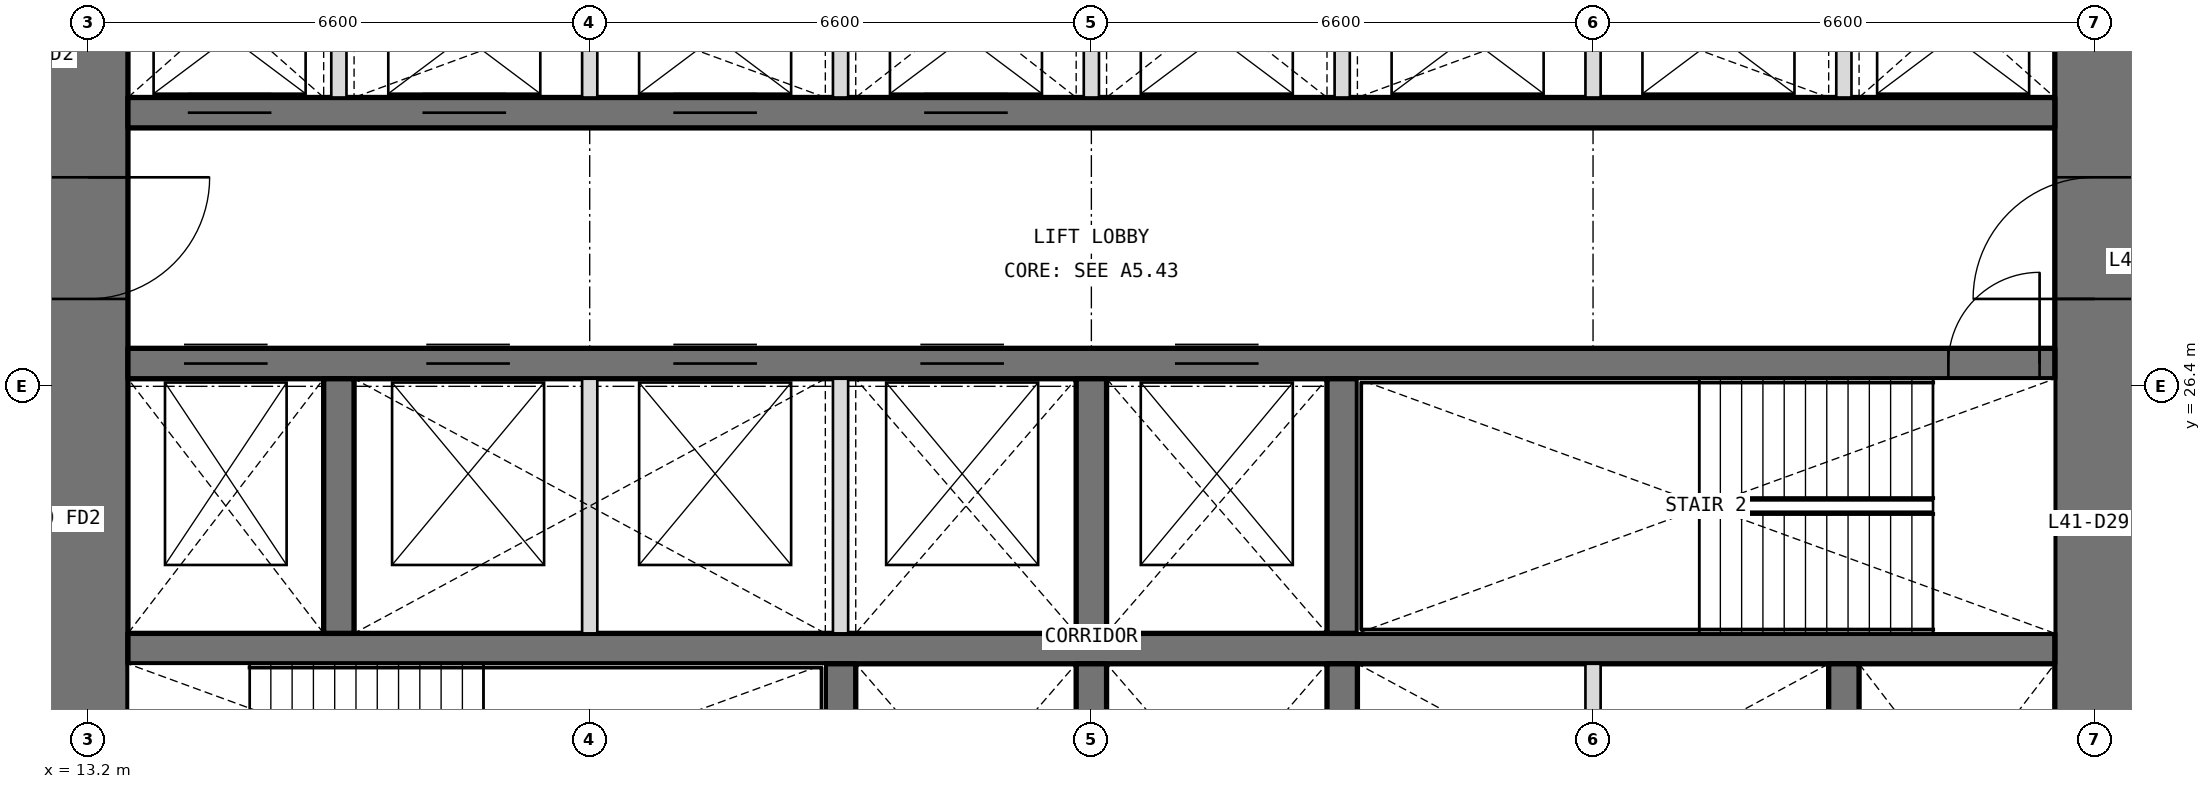
"""IFC4 building model, lengths in metres.
Left out: names, types, materials, properties, quantities, classifications, styles, units other than length and angle.
Written with IfcOpenShell. Run it as: python <this file> out.ifc"""

import sys

from ifc_helpers import new_model, si_unit, direction, frame, frame_2d, origin, place, context, subcontext, project, spatial, rectangle, extrude, element, fill, save


model = new_model("IFC4")
c1 = context("Model", 3, precision=1e-05, world=origin(), true_north=direction((0.0, 1.0)))
c2 = subcontext(c1, "Body", "Model", "MODEL_VIEW")
j1 = project(units=[si_unit("LENGTHUNIT", "METRE"), si_unit("PLANEANGLEUNIT", "RADIAN")], contexts=[c1])
p1 = place(None, origin())
s1 = spatial("IfcSite", under=j1, at=p1, CompositionType="ELEMENT")
p2 = place(p1, origin())
s2 = spatial("IfcBuilding", under=s1, at=p2, CompositionType="ELEMENT")
p3 = place(p2, frame((0.0, 0.0, 180.9)))
s3 = spatial("IfcBuildingStorey", under=s2, at=p3, CompositionType="ELEMENT", Elevation=180.9)
p4 = place(p3, frame((39.6, 13.725, 0.0), z_axis=(0.0, 0.0, 1.0), x_axis=(0.0, 1.0, 0.0)))
e1 = element("IfcWall", 1, at=p4, inside=s3, PredefinedType="SHEAR", context=c2, shape_type="SweptSolid", body=[
    extrude(rectangle(XDim=18.75, YDim=1.05, at=frame_2d((9.375, 0.0))), origin(), (0.0, 0.0, 1.0), 4.2),
])
p5 = place(p4, frame((3.025, 0.0, 0.0)))
e2 = element("IfcOpeningElement", 2, at=p5, cuts=e1, PredefinedType="OPENING", context=c2, shape_type="SweptSolid", body=[
    extrude(rectangle(XDim=1.6, YDim=2.1, at=frame_2d((0.8, 1.05))), frame((0.0, 0.535, 0.0), z_axis=(0.0, -1.0, 0.0), x_axis=(1.0, 0.0, 0.0)), (0.0, 0.0, 1.0), 1.07),
])
p6 = place(p4, frame((13.825, 0.0, 0.0)))
e3 = element("IfcOpeningElement", 3, at=p6, cuts=e1, PredefinedType="OPENING", context=c2, shape_type="SweptSolid", body=[
    extrude(rectangle(XDim=1.6, YDim=2.1, at=frame_2d((0.8, 1.05))), frame((0.0, 0.535, 0.0), z_axis=(0.0, -1.0, 0.0), x_axis=(1.0, 0.0, 0.0)), (0.0, 0.0, 1.0), 1.07),
])
p7 = place(p3, frame((13.2, 32.475, 0.0), z_axis=(0.0, 0.0, 1.0), x_axis=(0.0, -1.0, 0.0)))
e4 = element("IfcWall", 4, at=p7, inside=s3, PredefinedType="SHEAR", context=c2, shape_type="SweptSolid", body=[
    extrude(rectangle(XDim=18.75, YDim=1.05, at=frame_2d((9.375, 0.0))), origin(), (0.0, 0.0, 1.0), 4.2),
])
p8 = place(p7, frame((14.125, 0.0, 0.0)))
e5 = element("IfcOpeningElement", 5, at=p8, cuts=e4, PredefinedType="OPENING", context=c2, shape_type="SweptSolid", body=[
    extrude(rectangle(XDim=1.6, YDim=2.1, at=frame_2d((0.8, 1.05))), frame((0.0, 0.535, 0.0), z_axis=(0.0, -1.0, 0.0), x_axis=(1.0, 0.0, 0.0)), (0.0, 0.0, 1.0), 1.07),
])
p9 = place(p7, frame((3.325, 0.0, 0.0)))
e6 = element("IfcOpeningElement", 6, at=p9, cuts=e4, PredefinedType="OPENING", context=c2, shape_type="SweptSolid", body=[
    extrude(rectangle(XDim=1.6, YDim=2.1, at=frame_2d((0.8, 1.05))), frame((0.0, 0.535, 0.0), z_axis=(0.0, -1.0, 0.0), x_axis=(1.0, 0.0, 0.0)), (0.0, 0.0, 1.0), 1.07),
])
p10 = place(p3, frame((13.725, 22.95, 0.0), z_axis=(0.0, 0.0, 1.0), x_axis=(1.0, 0.0, 0.0)))
e7 = element("IfcWall", 7, at=p10, inside=s3, PredefinedType="SHEAR", context=c2, shape_type="SweptSolid", body=[
    extrude(rectangle(XDim=25.35, YDim=0.4, at=frame_2d((12.675, 0.0))), origin(), (0.0, 0.0, 1.0), 4.2),
])
p11 = place(p3, frame((13.725, 26.7, 0.0), z_axis=(0.0, 0.0, 1.0), x_axis=(1.0, 0.0, 0.0)))
e8 = element("IfcWall", 8, at=p11, inside=s3, PredefinedType="SHEAR", context=c2, shape_type="SweptSolid", body=[
    extrude(rectangle(XDim=25.35, YDim=0.4, at=frame_2d((12.675, 0.0))), origin(), (0.0, 0.0, 1.0), 4.2),
])
p12 = place(p11, frame((23.95, 0.0, 0.0)))
e9 = element("IfcOpeningElement", 9, at=p12, cuts=e8, PredefinedType="OPENING", context=c2, shape_type="SweptSolid", body=[
    extrude(rectangle(XDim=1.2, YDim=2.1, at=frame_2d((0.6, 1.05))), frame((0.0, 0.21, 0.0), z_axis=(0.0, -1.0, 0.0), x_axis=(1.0, 0.0, 0.0)), (0.0, 0.0, 1.0), 0.42),
])
p13 = place(p11, frame((0.738, 0.0, 0.0)))
e10 = element("IfcOpeningElement", 10, at=p13, cuts=e8, PredefinedType="OPENING", context=c2, shape_type="SweptSolid", body=[
    extrude(rectangle(XDim=1.1, YDim=2.1, at=frame_2d((0.55, 1.05))), frame((0.0, 0.21, 0.0), z_axis=(0.0, -1.0, 0.0), x_axis=(1.0, 0.0, 0.0)), (0.0, 0.0, 1.0), 0.42),
])
p14 = place(p11, frame((3.925, 0.0, 0.0)))
e11 = element("IfcOpeningElement", 11, at=p14, cuts=e8, PredefinedType="OPENING", context=c2, shape_type="SweptSolid", body=[
    extrude(rectangle(XDim=1.1, YDim=2.1, at=frame_2d((0.55, 1.05))), frame((0.0, 0.21, 0.0), z_axis=(0.0, -1.0, 0.0), x_axis=(1.0, 0.0, 0.0)), (0.0, 0.0, 1.0), 0.42),
])
p15 = place(p11, frame((7.175, 0.0, 0.0)))
e12 = element("IfcOpeningElement", 12, at=p15, cuts=e8, PredefinedType="OPENING", context=c2, shape_type="SweptSolid", body=[
    extrude(rectangle(XDim=1.1, YDim=2.1, at=frame_2d((0.55, 1.05))), frame((0.0, 0.21, 0.0), z_axis=(0.0, -1.0, 0.0), x_axis=(1.0, 0.0, 0.0)), (0.0, 0.0, 1.0), 0.42),
])
p16 = place(p11, frame((10.425, 0.0, 0.0)))
e13 = element("IfcOpeningElement", 13, at=p16, cuts=e8, PredefinedType="OPENING", context=c2, shape_type="SweptSolid", body=[
    extrude(rectangle(XDim=1.1, YDim=2.1, at=frame_2d((0.55, 1.05))), frame((0.0, 0.21, 0.0), z_axis=(0.0, -1.0, 0.0), x_axis=(1.0, 0.0, 0.0)), (0.0, 0.0, 1.0), 0.42),
])
p17 = place(p11, frame((13.775, 0.0, 0.0)))
e14 = element("IfcOpeningElement", 14, at=p17, cuts=e8, PredefinedType="OPENING", context=c2, shape_type="SweptSolid", body=[
    extrude(rectangle(XDim=1.1, YDim=2.1, at=frame_2d((0.55, 1.05))), frame((0.0, 0.21, 0.0), z_axis=(0.0, -1.0, 0.0), x_axis=(1.0, 0.0, 0.0)), (0.0, 0.0, 1.0), 0.42),
])
p18 = place(p3, frame((13.725, 30.0, 0.0), z_axis=(0.0, 0.0, 1.0), x_axis=(1.0, 0.0, 0.0)))
e15 = element("IfcWall", 15, at=p18, inside=s3, PredefinedType="SHEAR", context=c2, shape_type="SweptSolid", body=[
    extrude(rectangle(XDim=25.35, YDim=0.4, at=frame_2d((12.675, 0.0))), origin(), (0.0, 0.0, 1.0), 4.2),
])
p19 = place(p18, frame((0.788, 0.0, 0.0)))
e16 = element("IfcOpeningElement", 16, at=p19, cuts=e15, PredefinedType="OPENING", context=c2, shape_type="SweptSolid", body=[
    extrude(rectangle(XDim=1.1, YDim=2.1, at=frame_2d((0.55, 1.05))), frame((0.0, 0.21, 0.0), z_axis=(0.0, -1.0, 0.0), x_axis=(1.0, 0.0, 0.0)), (0.0, 0.0, 1.0), 0.42),
])
p20 = place(p18, frame((3.875, 0.0, 0.0)))
e17 = element("IfcOpeningElement", 17, at=p20, cuts=e15, PredefinedType="OPENING", context=c2, shape_type="SweptSolid", body=[
    extrude(rectangle(XDim=1.1, YDim=2.1, at=frame_2d((0.55, 1.05))), frame((0.0, 0.21, 0.0), z_axis=(0.0, -1.0, 0.0), x_axis=(1.0, 0.0, 0.0)), (0.0, 0.0, 1.0), 0.42),
])
p21 = place(p18, frame((7.175, 0.0, 0.0)))
e18 = element("IfcOpeningElement", 18, at=p21, cuts=e15, PredefinedType="OPENING", context=c2, shape_type="SweptSolid", body=[
    extrude(rectangle(XDim=1.1, YDim=2.1, at=frame_2d((0.55, 1.05))), frame((0.0, 0.21, 0.0), z_axis=(0.0, -1.0, 0.0), x_axis=(1.0, 0.0, 0.0)), (0.0, 0.0, 1.0), 0.42),
])
p22 = place(p18, frame((10.475, 0.0, 0.0)))
e19 = element("IfcOpeningElement", 19, at=p22, cuts=e15, PredefinedType="OPENING", context=c2, shape_type="SweptSolid", body=[
    extrude(rectangle(XDim=1.1, YDim=2.1, at=frame_2d((0.55, 1.05))), frame((0.0, 0.21, 0.0), z_axis=(0.0, -1.0, 0.0), x_axis=(1.0, 0.0, 0.0)), (0.0, 0.0, 1.0), 0.42),
])
for number, where, z_axis, x_axis in (
    (20, (23.1, 19.4, 0.0), (0.0, 0.0, 1.0), (0.0, 1.0, 0.0)),
    (21, (26.4, 19.4, 0.0), (0.0, 0.0, 1.0), (0.0, 1.0, 0.0)),
    (22, (29.7, 19.4, 0.0), (0.0, 0.0, 1.0), (0.0, 1.0, 0.0)),
    (23, (36.3, 19.4, 0.0), (0.0, 0.0, 1.0), (0.0, 1.0, 0.0)),
    (24, (16.5, 23.15, 0.0), (0.0, 0.0, 1.0), (0.0, 1.0, 0.0)),
    (25, (26.4, 23.15, 0.0), (0.0, 0.0, 1.0), (0.0, 1.0, 0.0)),
    (26, (29.7, 23.15, 0.0), (0.0, 0.0, 1.0), (0.0, 1.0, 0.0)),
):
    element("IfcWall", number, at=place(p3, frame(where, z_axis=z_axis, x_axis=x_axis)), inside=s3, PredefinedType="SHEAR", context=c2, shape_type="SweptSolid", body=[
        extrude(rectangle(XDim=3.35, YDim=0.4, at=frame_2d((1.675, 0.0))), origin(), (0.0, 0.0, 1.0), 4.2),
    ])
for number, where, z_axis, x_axis in (
    (27, (16.5, 30.2, 0.0), (0.0, 0.0, 1.0), (0.0, 1.0, 0.0)),
    (28, (19.8, 30.2, 0.0), (0.0, 0.0, 1.0), (0.0, 1.0, 0.0)),
    (29, (23.1, 30.2, 0.0), (0.0, 0.0, 1.0), (0.0, 1.0, 0.0)),
    (30, (26.4, 30.2, 0.0), (0.0, 0.0, 1.0), (0.0, 1.0, 0.0)),
    (31, (29.7, 30.2, 0.0), (0.0, 0.0, 1.0), (0.0, 1.0, 0.0)),
    (32, (33.0, 30.2, 0.0), (0.0, 0.0, 1.0), (0.0, 1.0, 0.0)),
    (33, (36.3, 30.2, 0.0), (0.0, 0.0, 1.0), (0.0, 1.0, 0.0)),
):
    element("IfcWall", number, at=place(p3, frame(where, z_axis=z_axis, x_axis=x_axis)), inside=s3, PredefinedType="PARTITIONING", context=c2, shape_type="SweptSolid", body=[
        extrude(rectangle(XDim=2.275, YDim=0.2, at=frame_2d((1.138, 0.0))), origin(), (0.0, 0.0, 1.0), 4.2),
    ])
for number, where, z_axis, x_axis in (
    (34, (33.0, 19.4, 0.0), (0.0, 0.0, 1.0), (0.0, 1.0, 0.0)),
    (35, (19.8, 23.15, 0.0), (0.0, 0.0, 1.0), (0.0, 1.0, 0.0)),
    (36, (23.1, 23.15, 0.0), (0.0, 0.0, 1.0), (0.0, 1.0, 0.0)),
):
    element("IfcWall", number, at=place(p3, frame(where, z_axis=z_axis, x_axis=x_axis)), inside=s3, PredefinedType="PARTITIONING", context=c2, shape_type="SweptSolid", body=[
        extrude(rectangle(XDim=3.35, YDim=0.2, at=frame_2d((1.675, 0.0))), origin(), (0.0, 0.0, 1.0), 4.2),
    ])
p23 = place(p12, origin())
e37 = element("IfcDoor", 37, at=p23, inside=s3, OperationType="SINGLE_SWING_RIGHT", PredefinedType="DOOR", context=c2, shape_type="SweptSolid", body=[
    extrude(rectangle(XDim=1.2, YDim=2.1, at=frame_2d((0.6, 1.05))), frame((0.0, 0.025, 0.0), z_axis=(0.0, -1.0, 0.0), x_axis=(1.0, 0.0, 0.0)), (0.0, 0.0, 1.0), 0.05),
])
fill(e9, e37)
p24 = place(p9, origin())
e38 = element("IfcDoor", 38, at=p24, inside=s3, OperationType="DOUBLE_DOOR_DOUBLE_SWING", PredefinedType="DOOR", context=c2, shape_type="SweptSolid", body=[
    extrude(rectangle(XDim=1.6, YDim=2.1, at=frame_2d((0.8, 1.05))), frame((0.0, 0.025, 0.0), z_axis=(0.0, -1.0, 0.0), x_axis=(1.0, 0.0, 0.0)), (0.0, 0.0, 1.0), 0.05),
])
fill(e6, e38)
p25 = place(p6, origin())
e39 = element("IfcDoor", 39, at=p25, inside=s3, OperationType="DOUBLE_DOOR_DOUBLE_SWING", PredefinedType="DOOR", context=c2, shape_type="SweptSolid", body=[
    extrude(rectangle(XDim=1.6, YDim=2.1, at=frame_2d((0.8, 1.05))), frame((0.0, 0.025, 0.0), z_axis=(0.0, -1.0, 0.0), x_axis=(1.0, 0.0, 0.0)), (0.0, 0.0, 1.0), 0.05),
])
fill(e3, e39)
p26 = place(p19, origin())
e40 = element("IfcDoor", 40, at=p26, inside=s3, OperationType="DOUBLE_DOOR_SLIDING", PredefinedType="DOOR", context=c2, shape_type="SweptSolid", body=[
    extrude(rectangle(XDim=1.1, YDim=2.1, at=frame_2d((0.55, 1.05))), frame((0.0, 0.025, 0.0), z_axis=(0.0, -1.0, 0.0), x_axis=(1.0, 0.0, 0.0)), (0.0, 0.0, 1.0), 0.05),
])
fill(e16, e40)
p27 = place(p20, origin())
e41 = element("IfcDoor", 41, at=p27, inside=s3, OperationType="DOUBLE_DOOR_SLIDING", PredefinedType="DOOR", context=c2, shape_type="SweptSolid", body=[
    extrude(rectangle(XDim=1.1, YDim=2.1, at=frame_2d((0.55, 1.05))), frame((0.0, 0.025, 0.0), z_axis=(0.0, -1.0, 0.0), x_axis=(1.0, 0.0, 0.0)), (0.0, 0.0, 1.0), 0.05),
])
fill(e17, e41)
p28 = place(p21, origin())
e42 = element("IfcDoor", 42, at=p28, inside=s3, OperationType="DOUBLE_DOOR_SLIDING", PredefinedType="DOOR", context=c2, shape_type="SweptSolid", body=[
    extrude(rectangle(XDim=1.1, YDim=2.1, at=frame_2d((0.55, 1.05))), frame((0.0, 0.025, 0.0), z_axis=(0.0, -1.0, 0.0), x_axis=(1.0, 0.0, 0.0)), (0.0, 0.0, 1.0), 0.05),
])
fill(e18, e42)
p29 = place(p22, origin())
e43 = element("IfcDoor", 43, at=p29, inside=s3, OperationType="DOUBLE_DOOR_SLIDING", PredefinedType="DOOR", context=c2, shape_type="SweptSolid", body=[
    extrude(rectangle(XDim=1.1, YDim=2.1, at=frame_2d((0.55, 1.05))), frame((0.0, 0.025, 0.0), z_axis=(0.0, -1.0, 0.0), x_axis=(1.0, 0.0, 0.0)), (0.0, 0.0, 1.0), 0.05),
])
fill(e19, e43)
p30 = place(p13, origin())
e44 = element("IfcDoor", 44, at=p30, inside=s3, OperationType="DOUBLE_DOOR_SLIDING", PredefinedType="DOOR", context=c2, shape_type="SweptSolid", body=[
    extrude(rectangle(XDim=1.1, YDim=2.1, at=frame_2d((0.55, 1.05))), frame((0.0, 0.025, 0.0), z_axis=(0.0, -1.0, 0.0), x_axis=(1.0, 0.0, 0.0)), (0.0, 0.0, 1.0), 0.05),
])
fill(e10, e44)
p31 = place(p14, origin())
e45 = element("IfcDoor", 45, at=p31, inside=s3, OperationType="DOUBLE_DOOR_SLIDING", PredefinedType="DOOR", context=c2, shape_type="SweptSolid", body=[
    extrude(rectangle(XDim=1.1, YDim=2.1, at=frame_2d((0.55, 1.05))), frame((0.0, 0.025, 0.0), z_axis=(0.0, -1.0, 0.0), x_axis=(1.0, 0.0, 0.0)), (0.0, 0.0, 1.0), 0.05),
])
fill(e11, e45)
p32 = place(p15, origin())
e46 = element("IfcDoor", 46, at=p32, inside=s3, OperationType="DOUBLE_DOOR_SLIDING", PredefinedType="DOOR", context=c2, shape_type="SweptSolid", body=[
    extrude(rectangle(XDim=1.1, YDim=2.1, at=frame_2d((0.55, 1.05))), frame((0.0, 0.025, 0.0), z_axis=(0.0, -1.0, 0.0), x_axis=(1.0, 0.0, 0.0)), (0.0, 0.0, 1.0), 0.05),
])
fill(e12, e46)
p33 = place(p16, origin())
e47 = element("IfcDoor", 47, at=p33, inside=s3, OperationType="DOUBLE_DOOR_SLIDING", PredefinedType="DOOR", context=c2, shape_type="SweptSolid", body=[
    extrude(rectangle(XDim=1.1, YDim=2.1, at=frame_2d((0.55, 1.05))), frame((0.0, 0.025, 0.0), z_axis=(0.0, -1.0, 0.0), x_axis=(1.0, 0.0, 0.0)), (0.0, 0.0, 1.0), 0.05),
])
fill(e13, e47)
p34 = place(p17, origin())
e48 = element("IfcDoor", 48, at=p34, inside=s3, OperationType="DOUBLE_DOOR_SLIDING", PredefinedType="DOOR", context=c2, shape_type="SweptSolid", body=[
    extrude(rectangle(XDim=1.1, YDim=2.1, at=frame_2d((0.55, 1.05))), frame((0.0, 0.025, 0.0), z_axis=(0.0, -1.0, 0.0), x_axis=(1.0, 0.0, 0.0)), (0.0, 0.0, 1.0), 0.05),
])
fill(e14, e48)
save(model, sys.argv[1])
